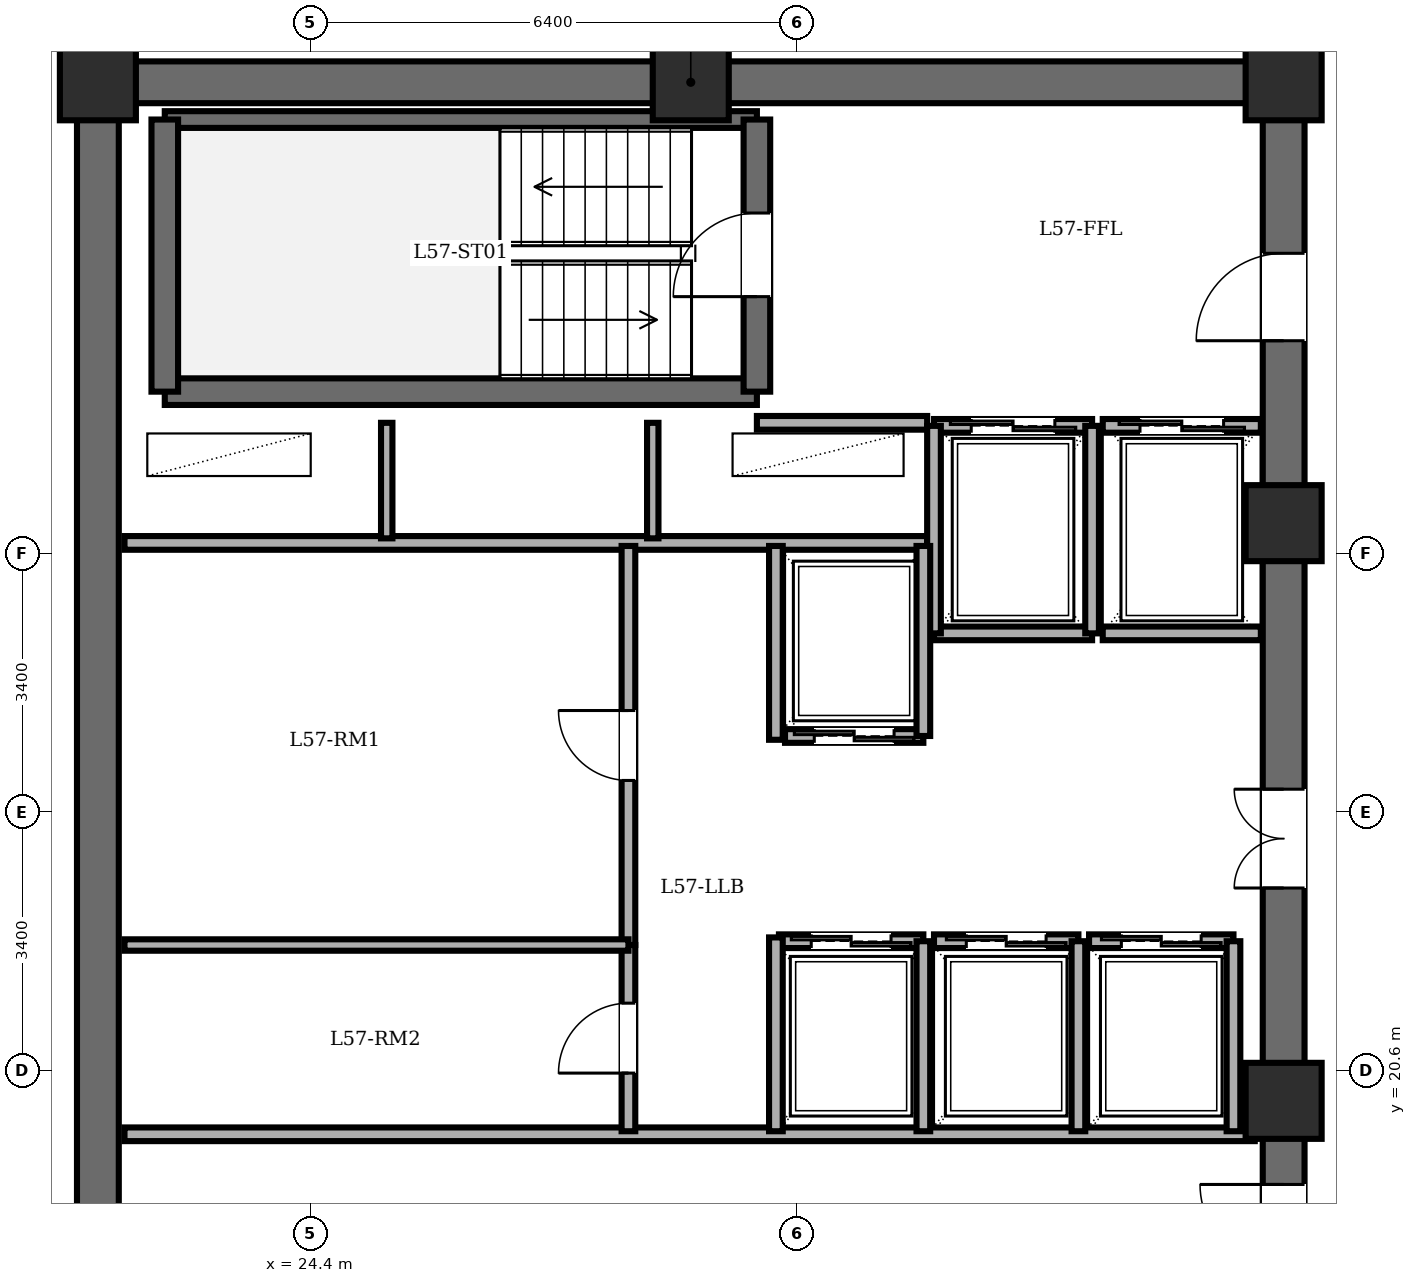
"""IFC4 building model, lengths in metres.
Left out: names, types, materials, properties, quantities, classifications, styles, units other than length and angle.
Written with IfcOpenShell. Run it as: python <this file> out.ifc"""

import sys

from ifc_helpers import new_model, si_unit, direction, frame, frame_2d, origin, origin_2d, place, context, subcontext, project, spatial, rectangle, extrude, element, fill, save


model = new_model("IFC4")
c1 = context("Model", 3, precision=1e-05, world=origin(), true_north=direction((0.0, 1.0)))
c2 = subcontext(c1, "Body", "Model", "MODEL_VIEW")
j1 = project(units=[si_unit("LENGTHUNIT", "METRE"), si_unit("PLANEANGLEUNIT", "RADIAN")], contexts=[c1])
p1 = place(None, origin())
s1 = spatial("IfcSite", under=j1, at=p1, CompositionType="ELEMENT")
p2 = place(p1, origin())
s2 = spatial("IfcBuilding", under=s1, at=p2, CompositionType="ELEMENT")
p3 = place(p2, frame((0.0, 0.0, 219.3)))
s3 = spatial("IfcBuildingStorey", under=s2, at=p3, CompositionType="ELEMENT", Elevation=219.3)
for number, where, z_axis, x_axis in (
    (1, (37.2, 20.2, 0.0), (0.0, 0.0, 1.0), (1.0, 0.0, 0.0)),
    (2, (37.2, 27.8, 0.0), (0.0, 0.0, 1.0), (1.0, 0.0, 0.0)),
    (3, (37.2, 33.6, 0.0), (0.0, 0.0, 1.0), (1.0, 0.0, 0.0)),
    (4, (29.4, 33.6, 0.0), (0.0, 0.0, 1.0), (1.0, 0.0, 0.0)),
    (5, (21.6, 33.6, 0.0), (0.0, 0.0, 1.0), (1.0, 0.0, 0.0)),
):
    element("IfcColumn", number, at=place(p3, frame(where, z_axis=z_axis, x_axis=x_axis)), inside=s3, PredefinedType="COLUMN", context=c2, shape_type="SweptSolid", body=[
        extrude(rectangle(XDim=1.0, YDim=1.0, at=origin_2d()), origin(), (0.0, 0.0, 1.0), 3.6),
    ])
p4 = place(p3, frame((21.6, 14.4, 0.0), z_axis=(0.0, 0.0, 1.0), x_axis=(0.0, 1.0, 0.0)))
e6 = element("IfcWall", 6, at=p4, inside=s3, PredefinedType="SHEAR", context=c2, shape_type="SweptSolid", body=[
    extrude(rectangle(XDim=19.2, YDim=0.55, at=frame_2d((9.6, 0.0))), origin(), (0.0, 0.0, 1.0), 3.4),
])
p5 = place(p3, frame((21.6, 33.6, 0.0), z_axis=(0.0, 0.0, 1.0), x_axis=(1.0, 0.0, 0.0)))
e7 = element("IfcWall", 7, at=p5, inside=s3, PredefinedType="SHEAR", context=c2, shape_type="SweptSolid", body=[
    extrude(rectangle(XDim=15.6, YDim=0.55, at=frame_2d((7.8, 0.0))), origin(), (0.0, 0.0, 1.0), 3.4),
])
p6 = place(p3, frame((37.2, 14.4, 0.0), z_axis=(0.0, 0.0, 1.0), x_axis=(0.0, 1.0, 0.0)))
e8 = element("IfcWall", 8, at=p6, inside=s3, PredefinedType="SHEAR", context=c2, shape_type="SweptSolid", body=[
    extrude(rectangle(XDim=19.2, YDim=0.55, at=frame_2d((9.6, 0.0))), origin(), (0.0, 0.0, 1.0), 3.4),
])
p7 = place(p6, frame((15.8, 0.0, 0.0)))
e9 = element("IfcOpeningElement", 9, at=p7, cuts=e8, PredefinedType="OPENING", context=c2, shape_type="SweptSolid", body=[
    extrude(rectangle(XDim=1.15, YDim=2.15, at=frame_2d((0.575, 1.075))), frame((0.0, 0.285, 0.0), z_axis=(0.0, -1.0, 0.0), x_axis=(1.0, 0.0, 0.0)), (0.0, 0.0, 1.0), 0.57),
])
p8 = place(p6, frame((3.6, 0.0, 0.0)))
e10 = element("IfcOpeningElement", 10, at=p8, cuts=e8, PredefinedType="OPENING", context=c2, shape_type="SweptSolid", body=[
    extrude(rectangle(XDim=1.1, YDim=2.15, at=frame_2d((0.55, 1.075))), frame((0.0, 0.285, 0.0), z_axis=(0.0, -1.0, 0.0), x_axis=(1.0, 0.0, 0.0)), (0.0, 0.0, 1.0), 0.57),
])
p9 = place(p6, frame((8.6, 0.0, 0.0)))
e11 = element("IfcOpeningElement", 11, at=p9, cuts=e8, PredefinedType="OPENING", context=c2, shape_type="SweptSolid", body=[
    extrude(rectangle(XDim=1.3, YDim=2.2, at=frame_2d((0.65, 1.1))), frame((0.0, 0.285, 0.0), z_axis=(0.0, -1.0, 0.0), x_axis=(1.0, 0.0, 0.0)), (0.0, 0.0, 1.0), 0.57),
])
p10 = place(p3, frame((22.48, 29.53, 0.0), z_axis=(0.0, 0.0, 1.0), x_axis=(1.0, 0.0, 0.0)))
e12 = element("IfcWall", 12, at=p10, inside=s3, PredefinedType="SOLIDWALL", context=c2, shape_type="SweptSolid", body=[
    extrude(rectangle(XDim=7.79, YDim=0.35, at=frame_2d((3.895, 0.0))), origin(), (0.0, 0.0, 1.0), 3.4),
])
p11 = place(p3, frame((22.48, 33.11, 0.0), z_axis=(0.0, 0.0, 1.0), x_axis=(1.0, 0.0, 0.0)))
e13 = element("IfcWall", 13, at=p11, inside=s3, PredefinedType="PARTITIONING", context=c2, shape_type="SweptSolid", body=[
    extrude(rectangle(XDim=7.79, YDim=0.22, at=frame_2d((3.895, 0.0))), origin(), (0.0, 0.0, 1.0), 3.4),
])
p12 = place(p3, frame((22.48, 29.53, 0.0), z_axis=(0.0, 0.0, 1.0), x_axis=(0.0, 1.0, 0.0)))
e14 = element("IfcWall", 14, at=p12, inside=s3, PredefinedType="SOLIDWALL", context=c2, shape_type="SweptSolid", body=[
    extrude(rectangle(XDim=3.58, YDim=0.35, at=frame_2d((1.79, 0.0))), origin(), (0.0, 0.0, 1.0), 3.4),
])
p13 = place(p3, frame((30.27, 29.53, 0.0), z_axis=(0.0, 0.0, 1.0), x_axis=(0.0, 1.0, 0.0)))
e15 = element("IfcWall", 15, at=p13, inside=s3, PredefinedType="SOLIDWALL", context=c2, shape_type="SweptSolid", body=[
    extrude(rectangle(XDim=3.58, YDim=0.35, at=frame_2d((1.79, 0.0))), origin(), (0.0, 0.0, 1.0), 3.4),
])
p14 = place(p13, frame((1.25, 0.0, 0.0)))
e16 = element("IfcOpeningElement", 16, at=p14, cuts=e15, PredefinedType="OPENING", context=c2, shape_type="SweptSolid", body=[
    extrude(rectangle(XDim=1.1, YDim=2.15, at=frame_2d((0.55, 1.075))), frame((0.0, 0.185, 0.0), z_axis=(0.0, -1.0, 0.0), x_axis=(1.0, 0.0, 0.0)), (0.0, 0.0, 1.0), 0.37),
])
p15 = place(p3, frame((30.27, 29.12, 0.0), z_axis=(0.0, 0.0, 1.0), x_axis=(1.0, 0.0, 0.0)))
e17 = element("IfcWall", 17, at=p15, inside=s3, PredefinedType="PARTITIONING", context=c2, shape_type="SweptSolid", body=[
    extrude(rectangle(XDim=2.24, YDim=0.18, at=frame_2d((1.12, 0.0))), origin(), (0.0, 0.0, 1.0), 3.4),
])
p16 = place(p3, frame((21.95, 27.54, 0.0), z_axis=(0.0, 0.0, 1.0), x_axis=(1.0, 0.0, 0.0)))
e18 = element("IfcWall", 18, at=p16, inside=s3, PredefinedType="PARTITIONING", context=c2, shape_type="SweptSolid", body=[
    extrude(rectangle(XDim=10.56, YDim=0.18, at=frame_2d((5.28, 0.0))), origin(), (0.0, 0.0, 1.0), 3.4),
])
for number, where, z_axis, x_axis in (
    (19, (25.4, 27.6, 0.0), (0.0, 0.0, 1.0), (0.0, 1.0, 0.0)),
    (20, (28.9, 27.6, 0.0), (0.0, 0.0, 1.0), (0.0, 1.0, 0.0)),
):
    element("IfcWall", number, at=place(p3, frame(where, z_axis=z_axis, x_axis=x_axis)), inside=s3, PredefinedType="PARTITIONING", context=c2, shape_type="SweptSolid", body=[
        extrude(rectangle(XDim=1.52, YDim=0.15, at=frame_2d((0.76, 0.0))), origin(), (0.0, 0.0, 1.0), 3.4),
    ])
p17 = place(p3, frame((21.95, 19.76, 0.0), z_axis=(0.0, 0.0, 1.0), x_axis=(1.0, 0.0, 0.0)))
e21 = element("IfcWall", 21, at=p17, inside=s3, PredefinedType="PARTITIONING", context=c2, shape_type="SweptSolid", body=[
    extrude(rectangle(XDim=14.87, YDim=0.18, at=frame_2d((7.435, 0.0))), origin(), (0.0, 0.0, 1.0), 3.4),
])
p18 = place(p3, frame((32.6, 29.08, 0.0), z_axis=(0.0, 0.0, 1.0), x_axis=(1.0, 0.0, 0.0)))
e22 = element("IfcWall", 22, at=p18, inside=s3, PredefinedType="PARTITIONING", context=c2, shape_type="SweptSolid", body=[
    extrude(rectangle(XDim=2.08, YDim=0.18, at=frame_2d((1.04, 0.0))), origin(), (0.0, 0.0, 1.0), 3.4),
])
p19 = place(p18, frame((0.49, 0.0, 0.0)))
e23 = element("IfcOpeningElement", 23, at=p19, cuts=e22, PredefinedType="OPENING", context=c2, shape_type="SweptSolid", body=[
    extrude(rectangle(XDim=1.1, YDim=2.2, at=frame_2d((0.55, 1.1))), frame((0.0, 0.1, 0.0), z_axis=(0.0, -1.0, 0.0), x_axis=(1.0, 0.0, 0.0)), (0.0, 0.0, 1.0), 0.2),
])
p20 = place(p3, frame((34.68, 26.35, 0.0), z_axis=(0.0, 0.0, 1.0), x_axis=(-1.0, 0.0, 0.0)))
e24 = element("IfcWall", 24, at=p20, inside=s3, PredefinedType="PARTITIONING", context=c2, shape_type="SweptSolid", body=[
    extrude(rectangle(XDim=2.08, YDim=0.18, at=frame_2d((1.04, 0.0))), origin(), (0.0, 0.0, 1.0), 3.4),
])
for number, where, z_axis, x_axis in (
    (25, (34.68, 26.35, 0.0), (0.0, 0.0, 1.0), (0.0, 1.0, 0.0)),
    (26, (32.6, 29.08, 0.0), (0.0, 0.0, 1.0), (0.0, -1.0, 0.0)),
):
    element("IfcWall", number, at=place(p3, frame(where, z_axis=z_axis, x_axis=x_axis)), inside=s3, PredefinedType="PARTITIONING", context=c2, shape_type="SweptSolid", body=[
        extrude(rectangle(XDim=2.73, YDim=0.18, at=frame_2d((1.365, 0.0))), origin(), (0.0, 0.0, 1.0), 3.4),
    ])
p21 = place(p3, frame((34.82, 29.08, 0.0), z_axis=(0.0, 0.0, 1.0), x_axis=(1.0, 0.0, 0.0)))
e27 = element("IfcWall", 27, at=p21, inside=s3, PredefinedType="PARTITIONING", context=c2, shape_type="SweptSolid", body=[
    extrude(rectangle(XDim=2.08, YDim=0.18, at=frame_2d((1.04, 0.0))), origin(), (0.0, 0.0, 1.0), 3.4),
])
p22 = place(p21, frame((0.49, 0.0, 0.0)))
e28 = element("IfcOpeningElement", 28, at=p22, cuts=e27, PredefinedType="OPENING", context=c2, shape_type="SweptSolid", body=[
    extrude(rectangle(XDim=1.1, YDim=2.2, at=frame_2d((0.55, 1.1))), frame((0.0, 0.1, 0.0), z_axis=(0.0, -1.0, 0.0), x_axis=(1.0, 0.0, 0.0)), (0.0, 0.0, 1.0), 0.2),
])
p23 = place(p3, frame((36.9, 26.35, 0.0), z_axis=(0.0, 0.0, 1.0), x_axis=(-1.0, 0.0, 0.0)))
e29 = element("IfcWall", 29, at=p23, inside=s3, PredefinedType="PARTITIONING", context=c2, shape_type="SweptSolid", body=[
    extrude(rectangle(XDim=2.08, YDim=0.18, at=frame_2d((1.04, 0.0))), origin(), (0.0, 0.0, 1.0), 3.4),
])
p24 = place(p3, frame((32.46, 25.0, 0.0), z_axis=(0.0, 0.0, 1.0), x_axis=(-1.0, 0.0, 0.0)))
e30 = element("IfcWall", 30, at=p24, inside=s3, PredefinedType="PARTITIONING", context=c2, shape_type="SweptSolid", body=[
    extrude(rectangle(XDim=1.82, YDim=0.18, at=frame_2d((0.91, 0.0))), origin(), (0.0, 0.0, 1.0), 3.4),
])
p25 = place(p24, frame((0.385, 0.0, 0.0)))
e31 = element("IfcOpeningElement", 31, at=p25, cuts=e30, PredefinedType="OPENING", context=c2, shape_type="SweptSolid", body=[
    extrude(rectangle(XDim=1.05, YDim=2.2, at=frame_2d((0.525, 1.1))), frame((0.0, 0.1, 0.0), z_axis=(0.0, -1.0, 0.0), x_axis=(1.0, 0.0, 0.0)), (0.0, 0.0, 1.0), 0.2),
])
p26 = place(p3, frame((32.46, 25.0, 0.0), z_axis=(0.0, 0.0, 1.0), x_axis=(0.0, 1.0, 0.0)))
e32 = element("IfcWall", 32, at=p26, inside=s3, PredefinedType="PARTITIONING", context=c2, shape_type="SweptSolid", body=[
    extrude(rectangle(XDim=2.5, YDim=0.18, at=frame_2d((1.25, 0.0))), origin(), (0.0, 0.0, 1.0), 3.4),
])
p27 = place(p3, frame((30.56, 22.3, 0.0), z_axis=(0.0, 0.0, 1.0), x_axis=(1.0, 0.0, 0.0)))
e33 = element("IfcWall", 33, at=p27, inside=s3, PredefinedType="PARTITIONING", context=c2, shape_type="SweptSolid", body=[
    extrude(rectangle(XDim=1.9, YDim=0.18, at=frame_2d((0.95, 0.0))), origin(), (0.0, 0.0, 1.0), 3.4),
])
p28 = place(p27, frame((0.425, 0.0, 0.0)))
e34 = element("IfcOpeningElement", 34, at=p28, cuts=e33, PredefinedType="OPENING", context=c2, shape_type="SweptSolid", body=[
    extrude(rectangle(XDim=1.05, YDim=2.2, at=frame_2d((0.525, 1.1))), frame((0.0, 0.1, 0.0), z_axis=(0.0, -1.0, 0.0), x_axis=(1.0, 0.0, 0.0)), (0.0, 0.0, 1.0), 0.2),
])
p29 = place(p3, frame((32.46, 19.8, 0.0), z_axis=(0.0, 0.0, 1.0), x_axis=(0.0, 1.0, 0.0)))
e35 = element("IfcWall", 35, at=p29, inside=s3, PredefinedType="PARTITIONING", context=c2, shape_type="SweptSolid", body=[
    extrude(rectangle(XDim=2.5, YDim=0.18, at=frame_2d((1.25, 0.0))), origin(), (0.0, 0.0, 1.0), 3.4),
])
p30 = place(p3, frame((32.6, 22.3, 0.0), z_axis=(0.0, 0.0, 1.0), x_axis=(1.0, 0.0, 0.0)))
e36 = element("IfcWall", 36, at=p30, inside=s3, PredefinedType="PARTITIONING", context=c2, shape_type="SweptSolid", body=[
    extrude(rectangle(XDim=1.9, YDim=0.18, at=frame_2d((0.95, 0.0))), origin(), (0.0, 0.0, 1.0), 3.4),
])
p31 = place(p30, frame((0.425, 0.0, 0.0)))
e37 = element("IfcOpeningElement", 37, at=p31, cuts=e36, PredefinedType="OPENING", context=c2, shape_type="SweptSolid", body=[
    extrude(rectangle(XDim=1.05, YDim=2.2, at=frame_2d((0.525, 1.1))), frame((0.0, 0.1, 0.0), z_axis=(0.0, -1.0, 0.0), x_axis=(1.0, 0.0, 0.0)), (0.0, 0.0, 1.0), 0.2),
])
p32 = place(p3, frame((34.5, 19.8, 0.0), z_axis=(0.0, 0.0, 1.0), x_axis=(0.0, 1.0, 0.0)))
e38 = element("IfcWall", 38, at=p32, inside=s3, PredefinedType="PARTITIONING", context=c2, shape_type="SweptSolid", body=[
    extrude(rectangle(XDim=2.5, YDim=0.18, at=frame_2d((1.25, 0.0))), origin(), (0.0, 0.0, 1.0), 3.4),
])
p33 = place(p3, frame((34.64, 22.3, 0.0), z_axis=(0.0, 0.0, 1.0), x_axis=(1.0, 0.0, 0.0)))
e39 = element("IfcWall", 39, at=p33, inside=s3, PredefinedType="PARTITIONING", context=c2, shape_type="SweptSolid", body=[
    extrude(rectangle(XDim=1.9, YDim=0.18, at=frame_2d((0.95, 0.0))), origin(), (0.0, 0.0, 1.0), 3.4),
])
p34 = place(p33, frame((0.425, 0.0, 0.0)))
e40 = element("IfcOpeningElement", 40, at=p34, cuts=e39, PredefinedType="OPENING", context=c2, shape_type="SweptSolid", body=[
    extrude(rectangle(XDim=1.05, YDim=2.2, at=frame_2d((0.525, 1.1))), frame((0.0, 0.1, 0.0), z_axis=(0.0, -1.0, 0.0), x_axis=(1.0, 0.0, 0.0)), (0.0, 0.0, 1.0), 0.2),
])
p35 = place(p3, frame((36.54, 19.8, 0.0), z_axis=(0.0, 0.0, 1.0), x_axis=(0.0, 1.0, 0.0)))
e41 = element("IfcWall", 41, at=p35, inside=s3, PredefinedType="PARTITIONING", context=c2, shape_type="SweptSolid", body=[
    extrude(rectangle(XDim=2.5, YDim=0.18, at=frame_2d((1.25, 0.0))), origin(), (0.0, 0.0, 1.0), 3.4),
])
for number, where, z_axis, x_axis in (
    (42, (30.52, 24.95, 0.0), (0.0, 0.0, 1.0), (0.0, 1.0, 0.0)),
    (43, (30.52, 19.8, 0.0), (0.0, 0.0, 1.0), (0.0, 1.0, 0.0)),
):
    element("IfcWall", number, at=place(p3, frame(where, z_axis=z_axis, x_axis=x_axis)), inside=s3, PredefinedType="PARTITIONING", context=c2, shape_type="SweptSolid", body=[
        extrude(rectangle(XDim=2.55, YDim=0.18, at=frame_2d((1.275, 0.0))), origin(), (0.0, 0.0, 1.0), 3.4),
    ])
p36 = place(p3, frame((28.58, 22.25, 0.0), z_axis=(0.0, 0.0, 1.0), x_axis=(0.0, 1.0, 0.0)))
e44 = element("IfcWall", 44, at=p36, inside=s3, PredefinedType="PARTITIONING", context=c2, shape_type="SweptSolid", body=[
    extrude(rectangle(XDim=5.25, YDim=0.18, at=frame_2d((2.625, 0.0))), origin(), (0.0, 0.0, 1.0), 3.4),
])
p37 = place(p36, frame((2.165, 0.0, 0.0)))
e45 = element("IfcOpeningElement", 45, at=p37, cuts=e44, PredefinedType="OPENING", context=c2, shape_type="SweptSolid", body=[
    extrude(rectangle(XDim=0.92, YDim=2.1, at=frame_2d((0.46, 1.05))), frame((0.0, 0.1, 0.0), z_axis=(0.0, -1.0, 0.0), x_axis=(1.0, 0.0, 0.0)), (0.0, 0.0, 1.0), 0.2),
])
p38 = place(p3, frame((28.58, 19.8, 0.0), z_axis=(0.0, 0.0, 1.0), x_axis=(0.0, 1.0, 0.0)))
e46 = element("IfcWall", 46, at=p38, inside=s3, PredefinedType="PARTITIONING", context=c2, shape_type="SweptSolid", body=[
    extrude(rectangle(XDim=2.45, YDim=0.18, at=frame_2d((1.225, 0.0))), origin(), (0.0, 0.0, 1.0), 3.4),
])
p39 = place(p38, frame((0.765, 0.0, 0.0)))
e47 = element("IfcOpeningElement", 47, at=p39, cuts=e46, PredefinedType="OPENING", context=c2, shape_type="SweptSolid", body=[
    extrude(rectangle(XDim=0.92, YDim=2.1, at=frame_2d((0.46, 1.05))), frame((0.0, 0.1, 0.0), z_axis=(0.0, -1.0, 0.0), x_axis=(1.0, 0.0, 0.0)), (0.0, 0.0, 1.0), 0.2),
])
p40 = place(p3, frame((21.95, 22.25, 0.0), z_axis=(0.0, 0.0, 1.0), x_axis=(1.0, 0.0, 0.0)))
e48 = element("IfcWall", 48, at=p40, inside=s3, PredefinedType="PARTITIONING", context=c2, shape_type="SweptSolid", body=[
    extrude(rectangle(XDim=6.63, YDim=0.15, at=frame_2d((3.315, 0.0))), origin(), (0.0, 0.0, 1.0), 3.4),
])
p41 = place(p14, origin())
e49 = element("IfcDoor", 49, at=p41, inside=s3, OperationType="SINGLE_SWING_LEFT", PredefinedType="DOOR", context=c2, shape_type="SweptSolid", body=[
    extrude(rectangle(XDim=1.1, YDim=2.15, at=frame_2d((0.55, 1.075))), frame((0.0, 0.025, 0.0), z_axis=(0.0, -1.0, 0.0), x_axis=(1.0, 0.0, 0.0)), (0.0, 0.0, 1.0), 0.05),
])
fill(e16, e49)
p42 = place(p7, origin())
e50 = element("IfcDoor", 50, at=p42, inside=s3, OperationType="SINGLE_SWING_LEFT", PredefinedType="DOOR", context=c2, shape_type="SweptSolid", body=[
    extrude(rectangle(XDim=1.15, YDim=2.15, at=frame_2d((0.575, 1.075))), frame((0.0, 0.025, 0.0), z_axis=(0.0, -1.0, 0.0), x_axis=(1.0, 0.0, 0.0)), (0.0, 0.0, 1.0), 0.05),
])
fill(e9, e50)
p43 = place(p8, origin())
e51 = element("IfcDoor", 51, at=p43, inside=s3, OperationType="SINGLE_SWING_RIGHT", PredefinedType="DOOR", context=c2, shape_type="SweptSolid", body=[
    extrude(rectangle(XDim=1.1, YDim=2.15, at=frame_2d((0.55, 1.075))), frame((0.0, 0.025, 0.0), z_axis=(0.0, -1.0, 0.0), x_axis=(1.0, 0.0, 0.0)), (0.0, 0.0, 1.0), 0.05),
])
fill(e10, e51)
p44 = place(p19, origin())
e52 = element("IfcDoor", 52, at=p44, inside=s3, OperationType="DOUBLE_DOOR_SLIDING", PredefinedType="DOOR", context=c2, shape_type="SweptSolid", body=[
    extrude(rectangle(XDim=1.1, YDim=2.2, at=frame_2d((0.55, 1.1))), frame((0.0, 0.025, 0.0), z_axis=(0.0, -1.0, 0.0), x_axis=(1.0, 0.0, 0.0)), (0.0, 0.0, 1.0), 0.05),
])
fill(e23, e52)
p45 = place(p22, origin())
e53 = element("IfcDoor", 53, at=p45, inside=s3, OperationType="DOUBLE_DOOR_SLIDING", PredefinedType="DOOR", context=c2, shape_type="SweptSolid", body=[
    extrude(rectangle(XDim=1.1, YDim=2.2, at=frame_2d((0.55, 1.1))), frame((0.0, 0.025, 0.0), z_axis=(0.0, -1.0, 0.0), x_axis=(1.0, 0.0, 0.0)), (0.0, 0.0, 1.0), 0.05),
])
fill(e28, e53)
p46 = place(p25, origin())
e54 = element("IfcDoor", 54, at=p46, inside=s3, OperationType="DOUBLE_DOOR_SLIDING", PredefinedType="DOOR", context=c2, shape_type="SweptSolid", body=[
    extrude(rectangle(XDim=1.05, YDim=2.2, at=frame_2d((0.525, 1.1))), frame((0.0, 0.025, 0.0), z_axis=(0.0, -1.0, 0.0), x_axis=(1.0, 0.0, 0.0)), (0.0, 0.0, 1.0), 0.05),
])
fill(e31, e54)
p47 = place(p28, origin())
e55 = element("IfcDoor", 55, at=p47, inside=s3, OperationType="DOUBLE_DOOR_SLIDING", PredefinedType="DOOR", context=c2, shape_type="SweptSolid", body=[
    extrude(rectangle(XDim=1.05, YDim=2.2, at=frame_2d((0.525, 1.1))), frame((0.0, 0.025, 0.0), z_axis=(0.0, -1.0, 0.0), x_axis=(1.0, 0.0, 0.0)), (0.0, 0.0, 1.0), 0.05),
])
fill(e34, e55)
p48 = place(p31, origin())
e56 = element("IfcDoor", 56, at=p48, inside=s3, OperationType="DOUBLE_DOOR_SLIDING", PredefinedType="DOOR", context=c2, shape_type="SweptSolid", body=[
    extrude(rectangle(XDim=1.05, YDim=2.2, at=frame_2d((0.525, 1.1))), frame((0.0, 0.025, 0.0), z_axis=(0.0, -1.0, 0.0), x_axis=(1.0, 0.0, 0.0)), (0.0, 0.0, 1.0), 0.05),
])
fill(e37, e56)
p49 = place(p34, origin())
e57 = element("IfcDoor", 57, at=p49, inside=s3, OperationType="DOUBLE_DOOR_SLIDING", PredefinedType="DOOR", context=c2, shape_type="SweptSolid", body=[
    extrude(rectangle(XDim=1.05, YDim=2.2, at=frame_2d((0.525, 1.1))), frame((0.0, 0.025, 0.0), z_axis=(0.0, -1.0, 0.0), x_axis=(1.0, 0.0, 0.0)), (0.0, 0.0, 1.0), 0.05),
])
fill(e40, e57)
p50 = place(p37, origin())
e58 = element("IfcDoor", 58, at=p50, inside=s3, OperationType="SINGLE_SWING_RIGHT", PredefinedType="DOOR", context=c2, shape_type="SweptSolid", body=[
    extrude(rectangle(XDim=0.92, YDim=2.1, at=frame_2d((0.46, 1.05))), frame((0.0, 0.025, 0.0), z_axis=(0.0, -1.0, 0.0), x_axis=(1.0, 0.0, 0.0)), (0.0, 0.0, 1.0), 0.05),
])
fill(e45, e58)
p51 = place(p39, origin())
e59 = element("IfcDoor", 59, at=p51, inside=s3, OperationType="SINGLE_SWING_LEFT", PredefinedType="DOOR", context=c2, shape_type="SweptSolid", body=[
    extrude(rectangle(XDim=0.92, YDim=2.1, at=frame_2d((0.46, 1.05))), frame((0.0, 0.025, 0.0), z_axis=(0.0, -1.0, 0.0), x_axis=(1.0, 0.0, 0.0)), (0.0, 0.0, 1.0), 0.05),
])
fill(e47, e59)
p52 = place(p9, origin())
e60 = element("IfcDoor", 60, at=p52, inside=s3, OperationType="DOUBLE_DOOR_SINGLE_SWING", PredefinedType="DOOR", context=c2, shape_type="SweptSolid", body=[
    extrude(rectangle(XDim=1.3, YDim=2.2, at=frame_2d((0.65, 1.1))), frame((0.0, 0.025, 0.0), z_axis=(0.0, -1.0, 0.0), x_axis=(1.0, 0.0, 0.0)), (0.0, 0.0, 1.0), 0.05),
])
fill(e11, e60)
save(model, sys.argv[1])
